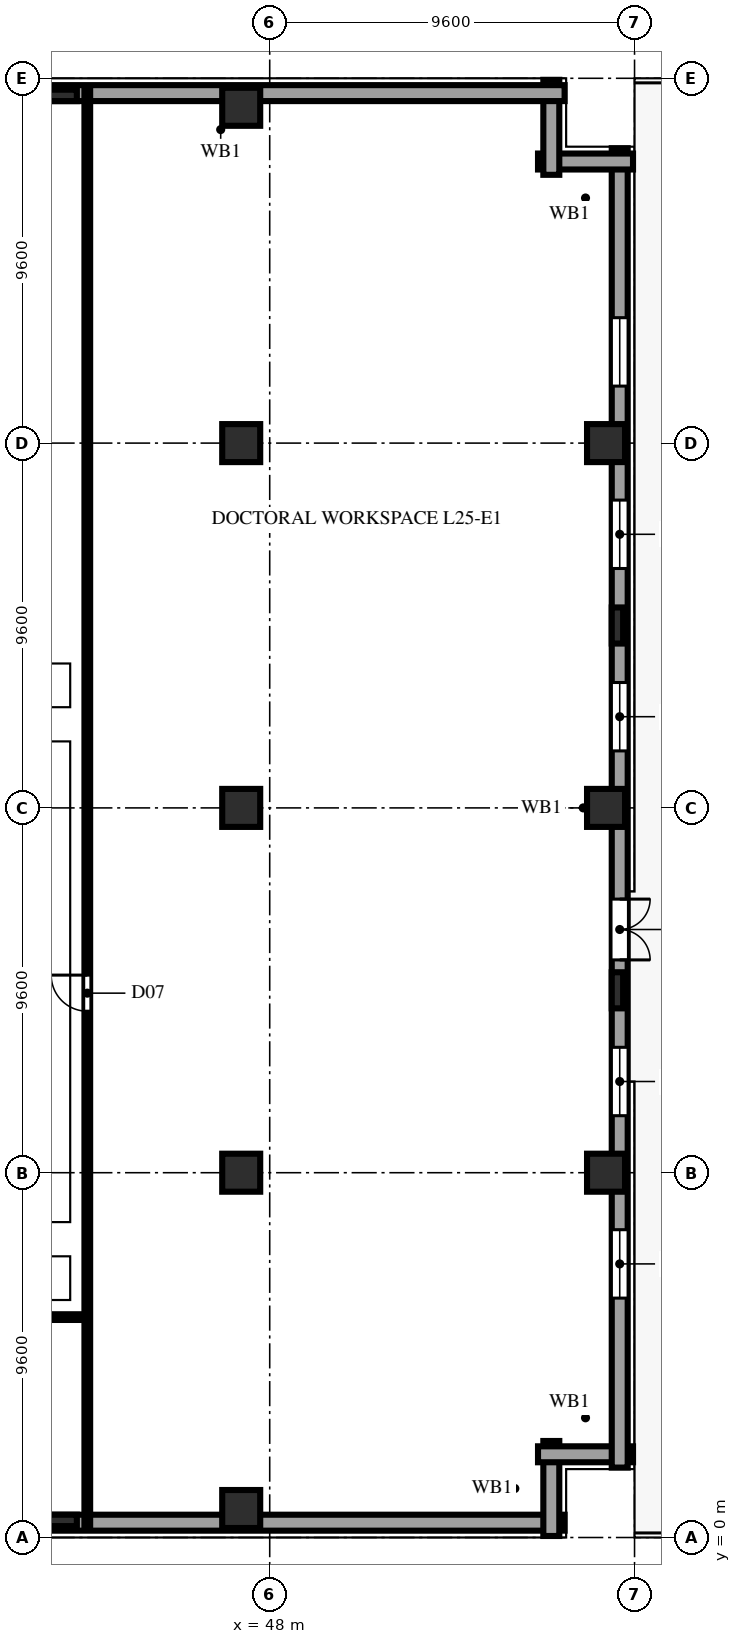
"""IFC4 building model, lengths in metres.
Left out: names, types, materials, properties, quantities, classifications, styles, units other than length and angle.
Written with IfcOpenShell. Run it as: python <this file> out.ifc"""

import sys

from ifc_helpers import new_model, si_unit, direction, frame, frame_2d, origin, origin_2d, place, context, subcontext, project, spatial, rectangle, extrude, element, fill, save


model = new_model("IFC4")
c1 = context("Model", 3, precision=1e-05, world=origin(), true_north=direction((0.0, 1.0)))
c2 = subcontext(c1, "Body", "Model", "MODEL_VIEW")
j1 = project(units=[si_unit("LENGTHUNIT", "METRE"), si_unit("PLANEANGLEUNIT", "RADIAN")], contexts=[c1])
p1 = place(None, origin())
s1 = spatial("IfcSite", under=j1, at=p1, CompositionType="ELEMENT")
p2 = place(p1, origin())
s2 = spatial("IfcBuilding", under=s1, at=p2, CompositionType="ELEMENT")
p3 = place(p2, frame((0.0, 0.0, 101.4)))
s3 = spatial("IfcBuildingStorey", under=s2, at=p3, CompositionType="ELEMENT", Elevation=101.4)
for number, where, z_axis, x_axis in (
    (1, (47.25, 0.75, 0.0), (0.0, 0.0, 1.0), (1.0, 0.0, 0.0)),
    (2, (47.25, 9.6, 0.0), (0.0, 0.0, 1.0), (1.0, 0.0, 0.0)),
    (3, (47.25, 19.2, 0.0), (0.0, 0.0, 1.0), (1.0, 0.0, 0.0)),
    (4, (47.25, 28.8, 0.0), (0.0, 0.0, 1.0), (1.0, 0.0, 0.0)),
    (5, (47.25, 37.65, 0.0), (0.0, 0.0, 1.0), (1.0, 0.0, 0.0)),
    (6, (56.85, 9.6, 0.0), (0.0, 0.0, 1.0), (1.0, 0.0, 0.0)),
    (7, (56.85, 19.2, 0.0), (0.0, 0.0, 1.0), (1.0, 0.0, 0.0)),
    (8, (56.85, 28.8, 0.0), (0.0, 0.0, 1.0), (1.0, 0.0, 0.0)),
):
    element("IfcColumn", number, at=place(p3, frame(where, z_axis=z_axis, x_axis=x_axis)), inside=s3, PredefinedType="COLUMN", context=c2, shape_type="SweptSolid", body=[
        extrude(rectangle(XDim=1.0, YDim=1.0, at=origin_2d()), origin(), (0.0, 0.0, 1.0), 3.8),
    ])
for number, where, z_axis, x_axis in (
    (9, (42.45, 0.45, 0.0), (0.0, 0.0, 1.0), (1.0, 0.0, 0.0)),
    (10, (57.15, 14.4, 0.0), (0.0, 0.0, 1.0), (0.0, 1.0, 0.0)),
    (11, (57.15, 24.0, 0.0), (0.0, 0.0, 1.0), (0.0, 1.0, 0.0)),
    (12, (42.45, 37.95, 0.0), (0.0, 0.0, 1.0), (1.0, 0.0, 0.0)),
):
    element("IfcColumn", number, at=place(p3, frame(where, z_axis=z_axis, x_axis=x_axis)), inside=s3, PredefinedType="PILASTER", context=c2, shape_type="SweptSolid", body=[
        extrude(rectangle(XDim=0.95, YDim=0.3, at=origin_2d()), origin(), (0.0, 0.0, 1.0), 3.8),
    ])
p4 = place(p3, frame((1.84, 0.39, 0.0), z_axis=(0.0, 0.0, 1.0), x_axis=(1.0, 0.0, 0.0)))
e13 = element("IfcWall", 13, at=p4, inside=s3, PredefinedType="SOLIDWALL", context=c2, shape_type="SweptSolid", body=[
    extrude(rectangle(XDim=53.92, YDim=0.42, at=frame_2d((26.96, 0.0))), origin(), (0.0, 0.0, 1.0), 3.54),
])
p5 = place(p4, frame((4.16, 0.0, 0.85)))
e14 = element("IfcOpeningElement", 14, at=p5, cuts=e13, PredefinedType="OPENING", context=c2, shape_type="SweptSolid", body=[
    extrude(rectangle(XDim=2.4, YDim=1.85, at=frame_2d((1.2, 0.925))), frame((0.0, 0.222, 0.0), z_axis=(0.0, -1.0, 0.0), x_axis=(1.0, 0.0, 0.0)), (0.0, 0.0, 1.0), 0.444),
])
p6 = place(p4, frame((13.76, 0.0, 0.85)))
e15 = element("IfcOpeningElement", 15, at=p6, cuts=e13, PredefinedType="OPENING", context=c2, shape_type="SweptSolid", body=[
    extrude(rectangle(XDim=2.4, YDim=1.85, at=frame_2d((1.2, 0.925))), frame((0.0, 0.222, 0.0), z_axis=(0.0, -1.0, 0.0), x_axis=(1.0, 0.0, 0.0)), (0.0, 0.0, 1.0), 0.444),
])
p7 = place(p4, frame((18.56, 0.0, 0.85)))
e16 = element("IfcOpeningElement", 16, at=p7, cuts=e13, PredefinedType="OPENING", context=c2, shape_type="SweptSolid", body=[
    extrude(rectangle(XDim=2.4, YDim=1.85, at=frame_2d((1.2, 0.925))), frame((0.0, 0.222, 0.0), z_axis=(0.0, -1.0, 0.0), x_axis=(1.0, 0.0, 0.0)), (0.0, 0.0, 1.0), 0.444),
])
p8 = place(p4, frame((28.16, 0.0, 0.85)))
e17 = element("IfcOpeningElement", 17, at=p8, cuts=e13, PredefinedType="OPENING", context=c2, shape_type="SweptSolid", body=[
    extrude(rectangle(XDim=2.4, YDim=1.85, at=frame_2d((1.2, 0.925))), frame((0.0, 0.222, 0.0), z_axis=(0.0, -1.0, 0.0), x_axis=(1.0, 0.0, 0.0)), (0.0, 0.0, 1.0), 0.444),
])
for number, where, z_axis, x_axis in (
    (18, (55.41, 0.04, 0.0), (0.0, 0.0, 1.0), (0.0, 1.0, 0.0)),
    (19, (55.06, 2.19, 0.0), (0.0, 0.0, 1.0), (1.0, 0.0, 0.0)),
):
    element("IfcWall", number, at=place(p3, frame(where, z_axis=z_axis, x_axis=x_axis)), inside=s3, PredefinedType="SOLIDWALL", context=c2, shape_type="SweptSolid", body=[
        extrude(rectangle(XDim=2.5, YDim=0.42, at=frame_2d((1.25, 0.0))), origin(), (0.0, 0.0, 1.0), 3.54),
    ])
p9 = place(p3, frame((57.21, 1.84, 0.0), z_axis=(0.0, 0.0, 1.0), x_axis=(0.0, 1.0, 0.0)))
e20 = element("IfcWall", 20, at=p9, inside=s3, PredefinedType="SOLIDWALL", context=c2, shape_type="SweptSolid", body=[
    extrude(rectangle(XDim=34.72, YDim=0.42, at=frame_2d((17.36, 0.0))), origin(), (0.0, 0.0, 1.0), 3.54),
])
p10 = place(p9, frame((13.36, 0.0, 0.0)))
e21 = element("IfcOpeningElement", 21, at=p10, cuts=e20, PredefinedType="OPENING", context=c2, shape_type="SweptSolid", body=[
    extrude(rectangle(XDim=1.6, YDim=2.3, at=frame_2d((0.8, 1.15))), frame((0.0, 0.222, 0.0), z_axis=(0.0, -1.0, 0.0), x_axis=(1.0, 0.0, 0.0)), (0.0, 0.0, 1.0), 0.444),
])
p11 = place(p9, frame((4.46, 0.0, 0.85)))
e22 = element("IfcOpeningElement", 22, at=p11, cuts=e20, PredefinedType="OPENING", context=c2, shape_type="SweptSolid", body=[
    extrude(rectangle(XDim=1.8, YDim=1.85, at=frame_2d((0.9, 0.925))), frame((0.0, 0.222, 0.0), z_axis=(0.0, -1.0, 0.0), x_axis=(1.0, 0.0, 0.0)), (0.0, 0.0, 1.0), 0.444),
])
p12 = place(p9, frame((9.26, 0.0, 0.85)))
e23 = element("IfcOpeningElement", 23, at=p12, cuts=e20, PredefinedType="OPENING", context=c2, shape_type="SweptSolid", body=[
    extrude(rectangle(XDim=1.8, YDim=1.85, at=frame_2d((0.9, 0.925))), frame((0.0, 0.222, 0.0), z_axis=(0.0, -1.0, 0.0), x_axis=(1.0, 0.0, 0.0)), (0.0, 0.0, 1.0), 0.444),
])
p13 = place(p9, frame((18.86, 0.0, 0.85)))
e24 = element("IfcOpeningElement", 24, at=p13, cuts=e20, PredefinedType="OPENING", context=c2, shape_type="SweptSolid", body=[
    extrude(rectangle(XDim=1.8, YDim=1.85, at=frame_2d((0.9, 0.925))), frame((0.0, 0.222, 0.0), z_axis=(0.0, -1.0, 0.0), x_axis=(1.0, 0.0, 0.0)), (0.0, 0.0, 1.0), 0.444),
])
p14 = place(p9, frame((23.66, 0.0, 0.85)))
e25 = element("IfcOpeningElement", 25, at=p14, cuts=e20, PredefinedType="OPENING", context=c2, shape_type="SweptSolid", body=[
    extrude(rectangle(XDim=1.8, YDim=1.85, at=frame_2d((0.9, 0.925))), frame((0.0, 0.222, 0.0), z_axis=(0.0, -1.0, 0.0), x_axis=(1.0, 0.0, 0.0)), (0.0, 0.0, 1.0), 0.444),
])
p15 = place(p9, frame((28.46, 0.0, 0.85)))
e26 = element("IfcOpeningElement", 26, at=p15, cuts=e20, PredefinedType="OPENING", context=c2, shape_type="SweptSolid", body=[
    extrude(rectangle(XDim=1.8, YDim=1.85, at=frame_2d((0.9, 0.925))), frame((0.0, 0.222, 0.0), z_axis=(0.0, -1.0, 0.0), x_axis=(1.0, 0.0, 0.0)), (0.0, 0.0, 1.0), 0.444),
])
for number, where, z_axis, x_axis in (
    (27, (57.56, 36.21, 0.0), (0.0, 0.0, 1.0), (-1.0, 0.0, 0.0)),
    (28, (55.41, 35.86, 0.0), (0.0, 0.0, 1.0), (0.0, 1.0, 0.0)),
):
    element("IfcWall", number, at=place(p3, frame(where, z_axis=z_axis, x_axis=x_axis)), inside=s3, PredefinedType="SOLIDWALL", context=c2, shape_type="SweptSolid", body=[
        extrude(rectangle(XDim=2.5, YDim=0.42, at=frame_2d((1.25, 0.0))), origin(), (0.0, 0.0, 1.0), 3.54),
    ])
p16 = place(p3, frame((55.76, 38.01, 0.0), z_axis=(0.0, 0.0, 1.0), x_axis=(-1.0, 0.0, 0.0)))
e29 = element("IfcWall", 29, at=p16, inside=s3, PredefinedType="SOLIDWALL", context=c2, shape_type="SweptSolid", body=[
    extrude(rectangle(XDim=18.1, YDim=0.42, at=frame_2d((9.05, 0.0))), origin(), (0.0, 0.0, 1.0), 3.54),
])
p17 = place(p3, frame((0.22, 5.8, 0.0), z_axis=(0.0, 0.0, 1.0), x_axis=(1.0, 0.0, 0.0)))
e30 = element("IfcWall", 30, at=p17, inside=s3, PredefinedType="PARTITIONING", context=c2, shape_type="SweptSolid", body=[
    extrude(rectangle(XDim=42.98, YDim=0.15, at=frame_2d((21.49, 0.0))), origin(), (0.0, 0.0, 1.0), 3.54),
])
p18 = place(p17, frame((10.18, 0.0, 0.0)))
e31 = element("IfcOpeningElement", 31, at=p18, cuts=e30, PredefinedType="OPENING", context=c2, shape_type="SweptSolid", body=[
    extrude(rectangle(XDim=0.95, YDim=2.15, at=frame_2d((0.475, 1.075))), frame((0.0, 0.087, 0.0), z_axis=(0.0, -1.0, 0.0), x_axis=(1.0, 0.0, 0.0)), (0.0, 0.0, 1.0), 0.174),
])
p19 = place(p17, frame((13.58, 0.0, 0.0)))
e32 = element("IfcOpeningElement", 32, at=p19, cuts=e30, PredefinedType="OPENING", context=c2, shape_type="SweptSolid", body=[
    extrude(rectangle(XDim=0.95, YDim=2.15, at=frame_2d((0.475, 1.075))), frame((0.0, 0.087, 0.0), z_axis=(0.0, -1.0, 0.0), x_axis=(1.0, 0.0, 0.0)), (0.0, 0.0, 1.0), 0.174),
])
p20 = place(p17, frame((32.53, 0.0, 0.0)))
e33 = element("IfcOpeningElement", 33, at=p20, cuts=e30, PredefinedType="OPENING", context=c2, shape_type="SweptSolid", body=[
    extrude(rectangle(XDim=0.95, YDim=2.15, at=frame_2d((0.475, 1.075))), frame((0.0, 0.087, 0.0), z_axis=(0.0, -1.0, 0.0), x_axis=(1.0, 0.0, 0.0)), (0.0, 0.0, 1.0), 0.174),
])
p21 = place(p3, frame((43.2, 0.22, 0.0), z_axis=(0.0, 0.0, 1.0), x_axis=(0.0, 1.0, 0.0)))
e34 = element("IfcWall", 34, at=p21, inside=s3, PredefinedType="PARTITIONING", context=c2, shape_type="SweptSolid", body=[
    extrude(rectangle(XDim=37.96, YDim=0.15, at=frame_2d((18.98, 0.0))), origin(), (0.0, 0.0, 1.0), 3.54),
])
p22 = place(p21, frame((13.63, 0.0, 0.0)))
e35 = element("IfcOpeningElement", 35, at=p22, cuts=e34, PredefinedType="OPENING", context=c2, shape_type="SweptSolid", body=[
    extrude(rectangle(XDim=0.95, YDim=2.15, at=frame_2d((0.475, 1.075))), frame((0.0, 0.087, 0.0), z_axis=(0.0, -1.0, 0.0), x_axis=(1.0, 0.0, 0.0)), (0.0, 0.0, 1.0), 0.174),
])
p23 = place(p10, frame((1.6, 0.0, 0.0), z_axis=(0.0, 0.0, 1.0), x_axis=(-1.0, 0.0, 0.0)))
e36 = element("IfcDoor", 36, at=p23, inside=s3, OperationType="DOUBLE_SWING_LEFT", PredefinedType="DOOR", context=c2, shape_type="SweptSolid", body=[
    extrude(rectangle(XDim=1.6, YDim=2.3, at=frame_2d((0.8, 1.15))), frame((0.0, 0.025, 0.0), z_axis=(0.0, -1.0, 0.0), x_axis=(1.0, 0.0, 0.0)), (0.0, 0.0, 1.0), 0.05),
])
fill(e21, e36)
p24 = place(p11, origin())
e37 = element("IfcWindow", 37, at=p24, inside=s3, PartitioningType="DOUBLE_PANEL_VERTICAL", PredefinedType="WINDOW", context=c2, shape_type="SweptSolid", body=[
    extrude(rectangle(XDim=1.8, YDim=1.85, at=frame_2d((0.9, 0.925))), frame((0.0, 0.11, 0.0), z_axis=(0.0, -1.0, 0.0), x_axis=(1.0, 0.0, 0.0)), (0.0, 0.0, 1.0), 0.06),
])
fill(e22, e37)
p25 = place(p12, origin())
e38 = element("IfcWindow", 38, at=p25, inside=s3, PartitioningType="DOUBLE_PANEL_VERTICAL", PredefinedType="WINDOW", context=c2, shape_type="SweptSolid", body=[
    extrude(rectangle(XDim=1.8, YDim=1.85, at=frame_2d((0.9, 0.925))), frame((0.0, 0.11, 0.0), z_axis=(0.0, -1.0, 0.0), x_axis=(1.0, 0.0, 0.0)), (0.0, 0.0, 1.0), 0.06),
])
fill(e23, e38)
p26 = place(p13, origin())
e39 = element("IfcWindow", 39, at=p26, inside=s3, PartitioningType="DOUBLE_PANEL_VERTICAL", PredefinedType="WINDOW", context=c2, shape_type="SweptSolid", body=[
    extrude(rectangle(XDim=1.8, YDim=1.85, at=frame_2d((0.9, 0.925))), frame((0.0, 0.11, 0.0), z_axis=(0.0, -1.0, 0.0), x_axis=(1.0, 0.0, 0.0)), (0.0, 0.0, 1.0), 0.06),
])
fill(e24, e39)
p27 = place(p14, origin())
e40 = element("IfcWindow", 40, at=p27, inside=s3, PartitioningType="DOUBLE_PANEL_VERTICAL", PredefinedType="WINDOW", context=c2, shape_type="SweptSolid", body=[
    extrude(rectangle(XDim=1.8, YDim=1.85, at=frame_2d((0.9, 0.925))), frame((0.0, 0.11, 0.0), z_axis=(0.0, -1.0, 0.0), x_axis=(1.0, 0.0, 0.0)), (0.0, 0.0, 1.0), 0.06),
])
fill(e25, e40)
p28 = place(p15, origin())
e41 = element("IfcWindow", 41, at=p28, inside=s3, PartitioningType="DOUBLE_PANEL_VERTICAL", PredefinedType="WINDOW", context=c2, shape_type="SweptSolid", body=[
    extrude(rectangle(XDim=1.8, YDim=1.85, at=frame_2d((0.9, 0.925))), frame((0.0, 0.11, 0.0), z_axis=(0.0, -1.0, 0.0), x_axis=(1.0, 0.0, 0.0)), (0.0, 0.0, 1.0), 0.06),
])
fill(e26, e41)
p29 = place(p22, origin())
e42 = element("IfcDoor", 42, at=p29, inside=s3, OperationType="SINGLE_SWING_RIGHT", PredefinedType="DOOR", context=c2, shape_type="SweptSolid", body=[
    extrude(rectangle(XDim=0.95, YDim=2.15, at=frame_2d((0.475, 1.075))), frame((0.0, 0.025, 0.0), z_axis=(0.0, -1.0, 0.0), x_axis=(1.0, 0.0, 0.0)), (0.0, 0.0, 1.0), 0.05),
])
fill(e35, e42)
save(model, sys.argv[1])
